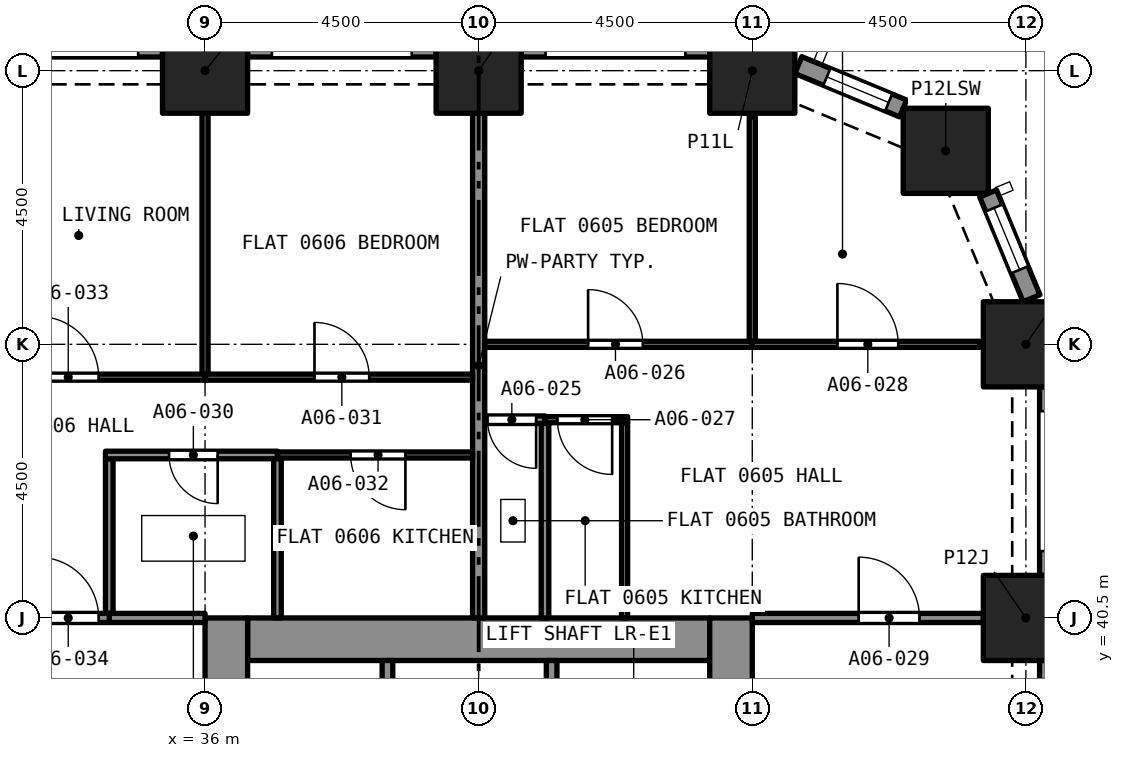
"""IFC4 building model, lengths in metres.
Left out: names, types, materials, properties, quantities, classifications, styles, units other than length and angle.
Written with IfcOpenShell. Run it as: python <this file> out.ifc"""

import sys

from ifc_helpers import new_model, si_unit, direction, frame, frame_2d, origin, origin_2d, place, context, subcontext, project, spatial, rectangle, extrude, element, fill, save


model = new_model("IFC4")
c1 = context("Model", 3, precision=1e-05, world=origin(), true_north=direction((0.0, 1.0)))
c2 = subcontext(c1, "Body", "Model", "MODEL_VIEW")
j1 = project(units=[si_unit("LENGTHUNIT", "METRE"), si_unit("PLANEANGLEUNIT", "RADIAN")], contexts=[c1])
p1 = place(None, origin())
s1 = spatial("IfcSite", under=j1, at=p1, CompositionType="ELEMENT")
p2 = place(p1, origin())
s2 = spatial("IfcBuilding", under=s1, at=p2, CompositionType="ELEMENT")
p3 = place(p2, frame((0.0, 0.0, 30.4)))
s3 = spatial("IfcBuildingStorey", under=s2, at=p3, CompositionType="ELEMENT", Elevation=30.4)
for number, where, z_axis, x_axis in (
    (1, (49.5, 40.5, 0.0), (0.0, 0.0, 1.0), (1.0, 0.0, 0.0)),
    (2, (49.5, 45.0, 0.0), (0.0, 0.0, 1.0), (1.0, 0.0, 0.0)),
    (3, (48.182, 48.182, 0.0), (0.0, 0.0, 1.0), (1.0, 0.0, 0.0)),
    (4, (36.0, 49.5, 0.0), (0.0, 0.0, 1.0), (1.0, 0.0, 0.0)),
    (5, (40.5, 49.5, 0.0), (0.0, 0.0, 1.0), (1.0, 0.0, 0.0)),
    (6, (45.0, 49.5, 0.0), (0.0, 0.0, 1.0), (1.0, 0.0, 0.0)),
):
    element("IfcColumn", number, at=place(p3, frame(where, z_axis=z_axis, x_axis=x_axis)), inside=s3, PredefinedType="COLUMN", context=c2, shape_type="SweptSolid", body=[
        extrude(rectangle(XDim=1.4, YDim=1.4, at=origin_2d()), origin(), (0.0, 0.0, 1.0), 3.2),
    ])
p4 = place(p3, frame((36.7, 40.15, 0.0), z_axis=(0.0, 0.0, 1.0), x_axis=(1.0, 0.0, 0.0)))
e7 = element("IfcWall", 7, at=p4, inside=s3, PredefinedType="SOLIDWALL", context=c2, shape_type="SweptSolid", body=[
    extrude(rectangle(XDim=7.6, YDim=0.7, at=frame_2d((3.8, 0.0))), origin(), (0.0, 0.0, 1.0), 3.2),
])
p5 = place(p3, frame((36.35, 27.0, 0.0), z_axis=(0.0, 0.0, 1.0), x_axis=(0.0, 1.0, 0.0)))
e8 = element("IfcWall", 8, at=p5, inside=s3, PredefinedType="SOLIDWALL", context=c2, shape_type="SweptSolid", body=[
    extrude(rectangle(XDim=13.5, YDim=0.7, at=frame_2d((6.75, 0.0))), origin(), (0.0, 0.0, 1.0), 3.2),
])
p6 = place(p5, frame((8.95, 0.0, 0.0)))
e9 = element("IfcOpeningElement", 9, at=p6, cuts=e8, PredefinedType="OPENING", context=c2, shape_type="SweptSolid", body=[
    extrude(rectangle(XDim=1.2, YDim=2.1, at=frame_2d((0.6, 1.05))), frame((0.0, 0.36, 0.0), z_axis=(0.0, -1.0, 0.0), x_axis=(1.0, 0.0, 0.0)), (0.0, 0.0, 1.0), 0.72),
])
p7 = place(p3, frame((44.65, 27.0, 0.0), z_axis=(0.0, 0.0, 1.0), x_axis=(0.0, 1.0, 0.0)))
e10 = element("IfcWall", 10, at=p7, inside=s3, PredefinedType="SOLIDWALL", context=c2, shape_type="SweptSolid", body=[
    extrude(rectangle(XDim=13.5, YDim=0.7, at=frame_2d((6.75, 0.0))), origin(), (0.0, 0.0, 1.0), 3.2),
])
p8 = place(p7, frame((8.95, 0.0, 0.0)))
e11 = element("IfcOpeningElement", 11, at=p8, cuts=e10, PredefinedType="OPENING", context=c2, shape_type="SweptSolid", body=[
    extrude(rectangle(XDim=1.2, YDim=2.1, at=frame_2d((0.6, 1.05))), frame((0.0, 0.36, 0.0), z_axis=(0.0, -1.0, 0.0), x_axis=(1.0, 0.0, 0.0)), (0.0, 0.0, 1.0), 0.72),
])
p9 = place(p3, frame((49.875, 39.8, 0.0), z_axis=(0.0, 0.0, 1.0), x_axis=(0.0, -1.0, 0.0)))
e12 = element("IfcWall", 12, at=p9, inside=s3, PredefinedType="SOLIDWALL", context=c2, shape_type="SweptSolid", body=[
    extrude(rectangle(XDim=3.1, YDim=0.3, at=frame_2d((1.55, 0.0))), origin(), (0.0, 0.0, 1.0), 3.2),
])
p10 = place(p9, frame((0.4, 0.0, 0.45)))
e13 = element("IfcOpeningElement", 13, at=p10, cuts=e12, PredefinedType="OPENING", context=c2, shape_type="SweptSolid", body=[
    extrude(rectangle(XDim=2.3, YDim=1.95, at=frame_2d((1.15, 0.975))), frame((0.0, 0.16, 0.0), z_axis=(0.0, -1.0, 0.0), x_axis=(1.0, 0.0, 0.0)), (0.0, 0.0, 1.0), 0.32),
])
p11 = place(p3, frame((49.875, 44.3, 0.0), z_axis=(0.0, 0.0, 1.0), x_axis=(0.0, -1.0, 0.0)))
e14 = element("IfcWall", 14, at=p11, inside=s3, PredefinedType="SOLIDWALL", context=c2, shape_type="SweptSolid", body=[
    extrude(rectangle(XDim=3.1, YDim=0.3, at=frame_2d((1.55, 0.0))), origin(), (0.0, 0.0, 1.0), 3.2),
])
p12 = place(p11, frame((0.4, 0.0, 0.45)))
e15 = element("IfcOpeningElement", 15, at=p12, cuts=e14, PredefinedType="OPENING", context=c2, shape_type="SweptSolid", body=[
    extrude(rectangle(XDim=2.3, YDim=1.95, at=frame_2d((1.15, 0.975))), frame((0.0, 0.16, 0.0), z_axis=(0.0, -1.0, 0.0), x_axis=(1.0, 0.0, 0.0)), (0.0, 0.0, 1.0), 0.32),
])
p13 = place(p3, frame((48.878, 47.48, 0.0), z_axis=(0.0, 0.0, 1.0), x_axis=(0.38262540684, -0.923903565336, 0.0)))
e16 = element("IfcWall", 16, at=p13, inside=s3, PredefinedType="SOLIDWALL", context=c2, shape_type="SweptSolid", body=[
    extrude(rectangle(XDim=1.865, YDim=0.3, at=frame_2d((0.933, 0.0))), origin(), (0.0, 0.0, 1.0), 3.2),
])
p14 = place(p13, frame((0.258, 0.0, 0.45)))
e17 = element("IfcOpeningElement", 17, at=p14, cuts=e16, PredefinedType="OPENING", context=c2, shape_type="SweptSolid", body=[
    extrude(rectangle(XDim=1.1, YDim=1.95, at=frame_2d((0.55, 0.975))), frame((0.0, 0.16, 0.0), z_axis=(0.0, -1.0, 0.0), x_axis=(1.0, 0.0, 0.0)), (0.0, 0.0, 1.0), 0.32),
])
p15 = place(p3, frame((45.757, 49.592, 0.0), z_axis=(0.0, 0.0, 1.0), x_axis=(0.923857286003, -0.382737135771, 0.0)))
e18 = element("IfcWall", 18, at=p15, inside=s3, PredefinedType="SOLIDWALL", context=c2, shape_type="SweptSolid", body=[
    extrude(rectangle(XDim=1.865, YDim=0.3, at=frame_2d((0.933, 0.0))), origin(), (0.0, 0.0, 1.0), 3.2),
])
p16 = place(p15, frame((0.508, 0.0, 0.45)))
e19 = element("IfcOpeningElement", 19, at=p16, cuts=e18, PredefinedType="OPENING", context=c2, shape_type="SweptSolid", body=[
    extrude(rectangle(XDim=1.1, YDim=1.95, at=frame_2d((0.55, 0.975))), frame((0.0, 0.16, 0.0), z_axis=(0.0, -1.0, 0.0), x_axis=(1.0, 0.0, 0.0)), (0.0, 0.0, 1.0), 0.32),
])
p17 = place(p3, frame((41.2, 49.875, 0.0), z_axis=(0.0, 0.0, 1.0), x_axis=(1.0, 0.0, 0.0)))
e20 = element("IfcWall", 20, at=p17, inside=s3, PredefinedType="SOLIDWALL", context=c2, shape_type="SweptSolid", body=[
    extrude(rectangle(XDim=3.1, YDim=0.3, at=frame_2d((1.55, 0.0))), origin(), (0.0, 0.0, 1.0), 3.2),
])
p18 = place(p17, frame((0.4, 0.0, 0.45)))
e21 = element("IfcOpeningElement", 21, at=p18, cuts=e20, PredefinedType="OPENING", context=c2, shape_type="SweptSolid", body=[
    extrude(rectangle(XDim=2.3, YDim=1.95, at=frame_2d((1.15, 0.975))), frame((0.0, 0.16, 0.0), z_axis=(0.0, -1.0, 0.0), x_axis=(1.0, 0.0, 0.0)), (0.0, 0.0, 1.0), 0.32),
])
p19 = place(p3, frame((36.7, 49.875, 0.0), z_axis=(0.0, 0.0, 1.0), x_axis=(1.0, 0.0, 0.0)))
e22 = element("IfcWall", 22, at=p19, inside=s3, PredefinedType="SOLIDWALL", context=c2, shape_type="SweptSolid", body=[
    extrude(rectangle(XDim=3.1, YDim=0.3, at=frame_2d((1.55, 0.0))), origin(), (0.0, 0.0, 1.0), 3.2),
])
p20 = place(p19, frame((0.4, 0.0, 0.45)))
e23 = element("IfcOpeningElement", 23, at=p20, cuts=e22, PredefinedType="OPENING", context=c2, shape_type="SweptSolid", body=[
    extrude(rectangle(XDim=2.3, YDim=1.95, at=frame_2d((1.15, 0.975))), frame((0.0, 0.16, 0.0), z_axis=(0.0, -1.0, 0.0), x_axis=(1.0, 0.0, 0.0)), (0.0, 0.0, 1.0), 0.32),
])
p21 = place(p3, frame((32.2, 49.875, 0.0), z_axis=(0.0, 0.0, 1.0), x_axis=(1.0, 0.0, 0.0)))
e24 = element("IfcWall", 24, at=p21, inside=s3, PredefinedType="SOLIDWALL", context=c2, shape_type="SweptSolid", body=[
    extrude(rectangle(XDim=3.1, YDim=0.3, at=frame_2d((1.55, 0.0))), origin(), (0.0, 0.0, 1.0), 3.2),
])
p22 = place(p21, frame((0.4, 0.0, 0.45)))
e25 = element("IfcOpeningElement", 25, at=p22, cuts=e24, PredefinedType="OPENING", context=c2, shape_type="SweptSolid", body=[
    extrude(rectangle(XDim=2.3, YDim=1.95, at=frame_2d((1.15, 0.975))), frame((0.0, 0.16, 0.0), z_axis=(0.0, -1.0, 0.0), x_axis=(1.0, 0.0, 0.0)), (0.0, 0.0, 1.0), 0.32),
])
p23 = place(p3, frame((41.591, 43.76, 0.0), z_axis=(0.0, 0.0, 1.0), x_axis=(-1.0, 0.0, 0.0)))
e26 = element("IfcWall", 26, at=p23, inside=s3, PredefinedType="PARTITIONING", context=c2, shape_type="SweptSolid", body=[
    extrude(rectangle(XDim=0.991, YDim=0.125, at=frame_2d((0.495, 0.0))), origin(), (0.0, 0.0, 1.0), 2.9),
])
p24 = place(p23, frame((0.146, 0.0, 0.0)))
e27 = element("IfcOpeningElement", 27, at=p24, cuts=e26, PredefinedType="OPENING", context=c2, shape_type="SweptSolid", body=[
    extrude(rectangle(XDim=0.8, YDim=2.1, at=frame_2d((0.4, 1.05))), frame((0.0, 0.073, 0.0), z_axis=(0.0, -1.0, 0.0), x_axis=(1.0, 0.0, 0.0)), (0.0, 0.0, 1.0), 0.145),
])
p25 = place(p3, frame((41.591, 40.5, 0.0), z_axis=(0.0, 0.0, 1.0), x_axis=(0.0, 1.0, 0.0)))
e28 = element("IfcWall", 28, at=p25, inside=s3, PredefinedType="PARTITIONING", context=c2, shape_type="SweptSolid", body=[
    extrude(rectangle(XDim=3.198, YDim=0.125, at=frame_2d((1.599, 0.0))), origin(), (0.0, 0.0, 1.0), 2.9),
])
p26 = place(p3, frame((40.5, 40.5, 0.0), z_axis=(0.0, 0.0, 1.0), x_axis=(0.0, 1.0, 0.0)))
e29 = element("IfcWall", 29, at=p26, inside=s3, PredefinedType="PARTITIONING", context=c2, shape_type="SweptSolid", body=[
    extrude(rectangle(XDim=8.3, YDim=0.2, at=frame_2d((4.15, 0.0))), origin(), (0.0, 0.0, 1.0), 2.9),
])
p27 = place(p3, frame((40.6, 45.0, 0.0), z_axis=(0.0, 0.0, 1.0), x_axis=(1.0, 0.0, 0.0)))
e30 = element("IfcWall", 30, at=p27, inside=s3, PredefinedType="PARTITIONING", context=c2, shape_type="SweptSolid", body=[
    extrude(rectangle(XDim=4.4, YDim=0.1, at=frame_2d((2.2, 0.0))), origin(), (0.0, 0.0, 1.0), 2.9),
])
p28 = place(p27, frame((1.7, 0.0, 0.0)))
e31 = element("IfcOpeningElement", 31, at=p28, cuts=e30, PredefinedType="OPENING", context=c2, shape_type="SweptSolid", body=[
    extrude(rectangle(XDim=0.9, YDim=2.1, at=frame_2d((0.45, 1.05))), frame((0.0, 0.06, 0.0), z_axis=(0.0, -1.0, 0.0), x_axis=(1.0, 0.0, 0.0)), (0.0, 0.0, 1.0), 0.12),
])
p29 = place(p3, frame((45.0, 45.05, 0.0), z_axis=(0.0, 0.0, 1.0), x_axis=(0.0, 1.0, 0.0)))
e32 = element("IfcWall", 32, at=p29, inside=s3, PredefinedType="PARTITIONING", context=c2, shape_type="SweptSolid", body=[
    extrude(rectangle(XDim=3.692, YDim=0.1, at=frame_2d((1.846, 0.0))), origin(), (0.0, 0.0, 1.0), 2.9),
])
p30 = place(p3, frame((42.9, 40.5, 0.0), z_axis=(0.0, 0.0, 1.0), x_axis=(0.0, 1.0, 0.0)))
e33 = element("IfcWall", 33, at=p30, inside=s3, PredefinedType="PARTITIONING", context=c2, shape_type="SweptSolid", body=[
    extrude(rectangle(XDim=3.21, YDim=0.1, at=frame_2d((1.605, 0.0))), origin(), (0.0, 0.0, 1.0), 2.9),
])
p31 = place(p3, frame((42.95, 43.76, 0.0), z_axis=(0.0, 0.0, 1.0), x_axis=(-1.0, 0.0, 0.0)))
e34 = element("IfcWall", 34, at=p31, inside=s3, PredefinedType="PARTITIONING", context=c2, shape_type="SweptSolid", body=[
    extrude(rectangle(XDim=1.359, YDim=0.1, at=frame_2d((0.68, 0.0))), origin(), (0.0, 0.0, 1.0), 2.9),
])
p32 = place(p31, frame((0.254, 0.0, 0.0)))
e35 = element("IfcOpeningElement", 35, at=p32, cuts=e34, PredefinedType="OPENING", context=c2, shape_type="SweptSolid", body=[
    extrude(rectangle(XDim=0.9, YDim=2.1, at=frame_2d((0.45, 1.05))), frame((0.0, 0.06, 0.0), z_axis=(0.0, -1.0, 0.0), x_axis=(1.0, 0.0, 0.0)), (0.0, 0.0, 1.0), 0.12),
])
p33 = place(p3, frame((45.0, 45.0, 0.0), z_axis=(0.0, 0.0, 1.0), x_axis=(1.0, 0.0, 0.0)))
e36 = element("IfcWall", 36, at=p33, inside=s3, PredefinedType="PARTITIONING", context=c2, shape_type="SweptSolid", body=[
    extrude(rectangle(XDim=3.742, YDim=0.1, at=frame_2d((1.871, 0.0))), origin(), (0.0, 0.0, 1.0), 2.9),
])
p34 = place(p33, frame((1.4, 0.0, 0.0)))
e37 = element("IfcOpeningElement", 37, at=p34, cuts=e36, PredefinedType="OPENING", context=c2, shape_type="SweptSolid", body=[
    extrude(rectangle(XDim=1.0, YDim=2.1, at=frame_2d((0.5, 1.05))), frame((0.0, 0.06, 0.0), z_axis=(0.0, -1.0, 0.0), x_axis=(1.0, 0.0, 0.0)), (0.0, 0.0, 1.0), 0.12),
])
p35 = place(p3, frame((45.0, 40.5, 0.0), z_axis=(0.0, 0.0, 1.0), x_axis=(1.0, 0.0, 0.0)))
e38 = element("IfcWall", 38, at=p35, inside=s3, PredefinedType="PARTITIONING", context=c2, shape_type="SweptSolid", body=[
    extrude(rectangle(XDim=3.8, YDim=0.15, at=frame_2d((1.9, 0.0))), origin(), (0.0, 0.0, 1.0), 2.9),
])
p36 = place(p35, frame((1.75, 0.0, 0.0)))
e39 = element("IfcOpeningElement", 39, at=p36, cuts=e38, PredefinedType="OPENING", context=c2, shape_type="SweptSolid", body=[
    extrude(rectangle(XDim=1.0, YDim=2.1, at=frame_2d((0.5, 1.05))), frame((0.0, 0.085, 0.0), z_axis=(0.0, -1.0, 0.0), x_axis=(1.0, 0.0, 0.0)), (0.0, 0.0, 1.0), 0.17),
])
p37 = place(p3, frame((34.425, 40.575, 0.0), z_axis=(0.0, 0.0, 1.0), x_axis=(0.0, 1.0, 0.0)))
e40 = element("IfcWall", 40, at=p37, inside=s3, PredefinedType="PARTITIONING", context=c2, shape_type="SweptSolid", body=[
    extrude(rectangle(XDim=2.542, YDim=0.125, at=frame_2d((1.271, 0.0))), origin(), (0.0, 0.0, 1.0), 2.9),
])
p38 = place(p3, frame((37.19, 43.18, 0.0), z_axis=(0.0, 0.0, 1.0), x_axis=(-1.0, 0.0, 0.0)))
e41 = element("IfcWall", 41, at=p38, inside=s3, PredefinedType="PARTITIONING", context=c2, shape_type="SweptSolid", body=[
    extrude(rectangle(XDim=2.828, YDim=0.125, at=frame_2d((1.414, 0.0))), origin(), (0.0, 0.0, 1.0), 2.9),
])
p39 = place(p38, frame((0.983, 0.0, 0.0)))
e42 = element("IfcOpeningElement", 42, at=p39, cuts=e41, PredefinedType="OPENING", context=c2, shape_type="SweptSolid", body=[
    extrude(rectangle(XDim=0.8, YDim=2.1, at=frame_2d((0.4, 1.05))), frame((0.0, 0.073, 0.0), z_axis=(0.0, -1.0, 0.0), x_axis=(1.0, 0.0, 0.0)), (0.0, 0.0, 1.0), 0.145),
])
p40 = place(p3, frame((37.191, 40.5, 0.0), z_axis=(0.0, 0.0, 1.0), x_axis=(0.0, 1.0, 0.0)))
e43 = element("IfcWall", 43, at=p40, inside=s3, PredefinedType="PARTITIONING", context=c2, shape_type="SweptSolid", body=[
    extrude(rectangle(XDim=2.617, YDim=0.125, at=frame_2d((1.309, 0.0))), origin(), (0.0, 0.0, 1.0), 2.9),
])
p41 = place(p3, frame((34.425, 40.5, 0.0), z_axis=(0.0, 0.0, 1.0), x_axis=(1.0, 0.0, 0.0)))
e44 = element("IfcWall", 44, at=p41, inside=s3, PredefinedType="PARTITIONING", context=c2, shape_type="SweptSolid", body=[
    extrude(rectangle(XDim=1.575, YDim=0.15, at=frame_2d((0.788, 0.0))), origin(), (0.0, 0.0, 1.0), 2.9),
])
p42 = place(p3, frame((36.0, 44.46, 0.0), z_axis=(0.0, 0.0, 1.0), x_axis=(1.0, 0.0, 0.0)))
e45 = element("IfcWall", 45, at=p42, inside=s3, PredefinedType="PARTITIONING", context=c2, shape_type="SweptSolid", body=[
    extrude(rectangle(XDim=4.4, YDim=0.1, at=frame_2d((2.2, 0.0))), origin(), (0.0, 0.0, 1.0), 2.9),
])
p43 = place(p42, frame((1.8, 0.0, 0.0)))
e46 = element("IfcOpeningElement", 46, at=p43, cuts=e45, PredefinedType="OPENING", context=c2, shape_type="SweptSolid", body=[
    extrude(rectangle(XDim=0.9, YDim=2.1, at=frame_2d((0.45, 1.05))), frame((0.0, 0.06, 0.0), z_axis=(0.0, -1.0, 0.0), x_axis=(1.0, 0.0, 0.0)), (0.0, 0.0, 1.0), 0.12),
])
p44 = place(p3, frame((36.0, 44.51, 0.0), z_axis=(0.0, 0.0, 1.0), x_axis=(0.0, 1.0, 0.0)))
e47 = element("IfcWall", 47, at=p44, inside=s3, PredefinedType="PARTITIONING", context=c2, shape_type="SweptSolid", body=[
    extrude(rectangle(XDim=4.29, YDim=0.1, at=frame_2d((2.145, 0.0))), origin(), (0.0, 0.0, 1.0), 2.9),
])
p45 = place(p3, frame((40.4, 43.18, 0.0), z_axis=(0.0, 0.0, 1.0), x_axis=(-1.0, 0.0, 0.0)))
e48 = element("IfcWall", 48, at=p45, inside=s3, PredefinedType="PARTITIONING", context=c2, shape_type="SweptSolid", body=[
    extrude(rectangle(XDim=3.209, YDim=0.1, at=frame_2d((1.605, 0.0))), origin(), (0.0, 0.0, 1.0), 2.9),
])
p46 = place(p45, frame((1.105, 0.0, 0.0)))
e49 = element("IfcOpeningElement", 49, at=p46, cuts=e48, PredefinedType="OPENING", context=c2, shape_type="SweptSolid", body=[
    extrude(rectangle(XDim=0.9, YDim=2.1, at=frame_2d((0.45, 1.05))), frame((0.0, 0.06, 0.0), z_axis=(0.0, -1.0, 0.0), x_axis=(1.0, 0.0, 0.0)), (0.0, 0.0, 1.0), 0.12),
])
p47 = place(p3, frame((32.2, 44.46, 0.0), z_axis=(0.0, 0.0, 1.0), x_axis=(1.0, 0.0, 0.0)))
e50 = element("IfcWall", 50, at=p47, inside=s3, PredefinedType="PARTITIONING", context=c2, shape_type="SweptSolid", body=[
    extrude(rectangle(XDim=3.8, YDim=0.1, at=frame_2d((1.9, 0.0))), origin(), (0.0, 0.0, 1.0), 2.9),
])
p48 = place(p47, frame((1.05, 0.0, 0.0)))
e51 = element("IfcOpeningElement", 51, at=p48, cuts=e50, PredefinedType="OPENING", context=c2, shape_type="SweptSolid", body=[
    extrude(rectangle(XDim=1.0, YDim=2.1, at=frame_2d((0.5, 1.05))), frame((0.0, 0.06, 0.0), z_axis=(0.0, -1.0, 0.0), x_axis=(1.0, 0.0, 0.0)), (0.0, 0.0, 1.0), 0.12),
])
p49 = place(p3, frame((32.2, 40.5, 0.0), z_axis=(0.0, 0.0, 1.0), x_axis=(1.0, 0.0, 0.0)))
e52 = element("IfcWall", 52, at=p49, inside=s3, PredefinedType="PARTITIONING", context=c2, shape_type="SweptSolid", body=[
    extrude(rectangle(XDim=2.225, YDim=0.15, at=frame_2d((1.113, 0.0))), origin(), (0.0, 0.0, 1.0), 2.9),
])
p50 = place(p49, frame((1.05, 0.0, 0.0)))
e53 = element("IfcOpeningElement", 53, at=p50, cuts=e52, PredefinedType="OPENING", context=c2, shape_type="SweptSolid", body=[
    extrude(rectangle(XDim=1.0, YDim=2.1, at=frame_2d((0.5, 1.05))), frame((0.0, 0.085, 0.0), z_axis=(0.0, -1.0, 0.0), x_axis=(1.0, 0.0, 0.0)), (0.0, 0.0, 1.0), 0.17),
])
for number, where, z_axis, x_axis in (
    (54, (41.7, 37.5, 0.0), (0.0, 0.0, 1.0), (0.0, 1.0, 0.0)),
    (55, (39.0, 37.5, 0.0), (0.0, 0.0, 1.0), (0.0, 1.0, 0.0)),
):
    element("IfcWall", number, at=place(p3, frame(where, z_axis=z_axis, x_axis=x_axis)), inside=s3, PredefinedType="SOLIDWALL", context=c2, shape_type="SweptSolid", body=[
        extrude(rectangle(XDim=2.3, YDim=0.175, at=frame_2d((1.15, 0.0))), origin(), (0.0, 0.0, 1.0), 2.9),
    ])
p51 = place(p14, origin())
e56 = element("IfcWindow", 56, at=p51, inside=s3, PartitioningType="SINGLE_PANEL", PredefinedType="WINDOW", context=c2, shape_type="SweptSolid", body=[
    extrude(rectangle(XDim=1.1, YDim=1.95, at=frame_2d((0.55, 0.975))), frame((0.0, 0.03, 0.0), z_axis=(0.0, -1.0, 0.0), x_axis=(1.0, 0.0, 0.0)), (0.0, 0.0, 1.0), 0.06),
])
fill(e17, e56)
p52 = place(p16, origin())
e57 = element("IfcWindow", 57, at=p52, inside=s3, PartitioningType="SINGLE_PANEL", PredefinedType="WINDOW", context=c2, shape_type="SweptSolid", body=[
    extrude(rectangle(XDim=1.1, YDim=1.95, at=frame_2d((0.55, 0.975))), frame((0.0, 0.03, 0.0), z_axis=(0.0, -1.0, 0.0), x_axis=(1.0, 0.0, 0.0)), (0.0, 0.0, 1.0), 0.06),
])
fill(e19, e57)
p53 = place(p24, origin())
e58 = element("IfcDoor", 58, at=p53, inside=s3, OperationType="SINGLE_SWING_RIGHT", PredefinedType="DOOR", context=c2, shape_type="SweptSolid", body=[
    extrude(rectangle(XDim=0.8, YDim=2.1, at=frame_2d((0.4, 1.05))), frame((0.0, 0.025, 0.0), z_axis=(0.0, -1.0, 0.0), x_axis=(1.0, 0.0, 0.0)), (0.0, 0.0, 1.0), 0.05),
])
fill(e27, e58)
p54 = place(p28, origin())
e59 = element("IfcDoor", 59, at=p54, inside=s3, OperationType="SINGLE_SWING_LEFT", PredefinedType="DOOR", context=c2, shape_type="SweptSolid", body=[
    extrude(rectangle(XDim=0.9, YDim=2.1, at=frame_2d((0.45, 1.05))), frame((0.0, 0.025, 0.0), z_axis=(0.0, -1.0, 0.0), x_axis=(1.0, 0.0, 0.0)), (0.0, 0.0, 1.0), 0.05),
])
fill(e31, e59)
p55 = place(p32, origin())
e60 = element("IfcDoor", 60, at=p55, inside=s3, OperationType="SINGLE_SWING_RIGHT", PredefinedType="DOOR", context=c2, shape_type="SweptSolid", body=[
    extrude(rectangle(XDim=0.9, YDim=2.1, at=frame_2d((0.45, 1.05))), frame((0.0, 0.025, 0.0), z_axis=(0.0, -1.0, 0.0), x_axis=(1.0, 0.0, 0.0)), (0.0, 0.0, 1.0), 0.05),
])
fill(e35, e60)
p56 = place(p34, origin())
e61 = element("IfcDoor", 61, at=p56, inside=s3, OperationType="SINGLE_SWING_RIGHT", PredefinedType="DOOR", context=c2, shape_type="SweptSolid", body=[
    extrude(rectangle(XDim=1.0, YDim=2.1, at=frame_2d((0.5, 1.05))), frame((0.0, 0.025, 0.0), z_axis=(0.0, -1.0, 0.0), x_axis=(1.0, 0.0, 0.0)), (0.0, 0.0, 1.0), 0.05),
])
fill(e37, e61)
p57 = place(p36, origin())
e62 = element("IfcDoor", 62, at=p57, inside=s3, OperationType="SINGLE_SWING_RIGHT", PredefinedType="DOOR", context=c2, shape_type="SweptSolid", body=[
    extrude(rectangle(XDim=1.0, YDim=2.1, at=frame_2d((0.5, 1.05))), frame((0.0, 0.025, 0.0), z_axis=(0.0, -1.0, 0.0), x_axis=(1.0, 0.0, 0.0)), (0.0, 0.0, 1.0), 0.05),
])
fill(e39, e62)
p58 = place(p39, origin())
e63 = element("IfcDoor", 63, at=p58, inside=s3, OperationType="SINGLE_SWING_LEFT", PredefinedType="DOOR", context=c2, shape_type="SweptSolid", body=[
    extrude(rectangle(XDim=0.8, YDim=2.1, at=frame_2d((0.4, 1.05))), frame((0.0, 0.025, 0.0), z_axis=(0.0, -1.0, 0.0), x_axis=(1.0, 0.0, 0.0)), (0.0, 0.0, 1.0), 0.05),
])
fill(e42, e63)
p59 = place(p43, origin())
e64 = element("IfcDoor", 64, at=p59, inside=s3, OperationType="SINGLE_SWING_RIGHT", PredefinedType="DOOR", context=c2, shape_type="SweptSolid", body=[
    extrude(rectangle(XDim=0.9, YDim=2.1, at=frame_2d((0.45, 1.05))), frame((0.0, 0.025, 0.0), z_axis=(0.0, -1.0, 0.0), x_axis=(1.0, 0.0, 0.0)), (0.0, 0.0, 1.0), 0.05),
])
fill(e46, e64)
p60 = place(p46, origin())
e65 = element("IfcDoor", 65, at=p60, inside=s3, OperationType="SINGLE_SWING_LEFT", PredefinedType="DOOR", context=c2, shape_type="SweptSolid", body=[
    extrude(rectangle(XDim=0.9, YDim=2.1, at=frame_2d((0.45, 1.05))), frame((0.0, 0.025, 0.0), z_axis=(0.0, -1.0, 0.0), x_axis=(1.0, 0.0, 0.0)), (0.0, 0.0, 1.0), 0.05),
])
fill(e49, e65)
p61 = place(p48, origin())
e66 = element("IfcDoor", 66, at=p61, inside=s3, OperationType="SINGLE_SWING_LEFT", PredefinedType="DOOR", context=c2, shape_type="SweptSolid", body=[
    extrude(rectangle(XDim=1.0, YDim=2.1, at=frame_2d((0.5, 1.05))), frame((0.0, 0.025, 0.0), z_axis=(0.0, -1.0, 0.0), x_axis=(1.0, 0.0, 0.0)), (0.0, 0.0, 1.0), 0.05),
])
fill(e51, e66)
p62 = place(p50, origin())
e67 = element("IfcDoor", 67, at=p62, inside=s3, OperationType="SINGLE_SWING_RIGHT", PredefinedType="DOOR", context=c2, shape_type="SweptSolid", body=[
    extrude(rectangle(XDim=1.0, YDim=2.1, at=frame_2d((0.5, 1.05))), frame((0.0, 0.025, 0.0), z_axis=(0.0, -1.0, 0.0), x_axis=(1.0, 0.0, 0.0)), (0.0, 0.0, 1.0), 0.05),
])
fill(e53, e67)
save(model, sys.argv[1])
